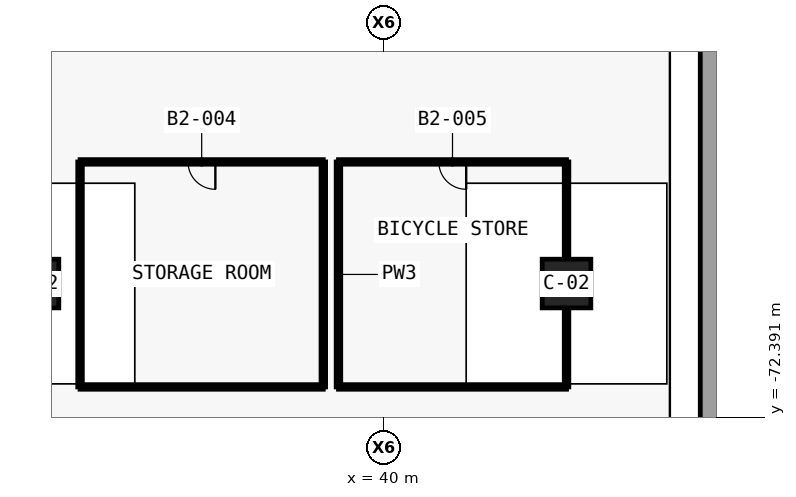
"""IFC4 building model, lengths in metres.
Left out: names, types, materials, properties, quantities, classifications, styles, units other than length and angle.
Written with IfcOpenShell. Run it as: python <this file> out.ifc"""

import sys

from ifc_helpers import new_model, si_unit, direction, frame, frame_2d, origin, origin_2d, place, context, subcontext, project, spatial, polyline, rectangle, outline, extrude, element, fill, save


model = new_model("IFC4")
c1 = context("Model", 3, precision=1e-05, world=origin(), true_north=direction((0.0, 1.0)))
c2 = subcontext(c1, "Body", "Model", "MODEL_VIEW")
j1 = project(units=[si_unit("LENGTHUNIT", "METRE"), si_unit("PLANEANGLEUNIT", "RADIAN")], contexts=[c1])
p1 = place(None, origin())
s1 = spatial("IfcSite", under=j1, at=p1, CompositionType="ELEMENT")
p2 = place(p1, origin())
s2 = spatial("IfcBuilding", under=s1, at=p2, CompositionType="ELEMENT")
p3 = place(p2, frame((0.0, 0.0, -9.0)))
s3 = spatial("IfcBuildingStorey", under=s2, at=p3, CompositionType="ELEMENT", Elevation=-9.0)
p4 = place(p3, frame((50.7, -83.0, 0.0), z_axis=(0.0, 0.0, 1.0), x_axis=(0.0, 1.0, 0.0)))
e1 = element("IfcWall", 1, at=p4, inside=s3, PredefinedType="SOLIDWALL", context=c2, shape_type="SweptSolid", body=[
    extrude(outline(polyline([(0.6, -0.3), (0.6, 0.3), (81.4, 0.3), (82.0, 0.3), (82.0, -0.3), (0.6, -0.3)])), origin(), (0.0, 0.0, 1.0), 4.5),
])
for number, where, z_axis, x_axis in (
    (2, (28.5, -68.0, 0.0), (0.0, 0.0, 1.0), (1.0, 0.0, 0.0)),
    (3, (46.0, -68.0, 0.0), (0.0, 0.0, 1.0), (1.0, 0.0, 0.0)),
):
    element("IfcColumn", number, at=place(p3, frame(where, z_axis=z_axis, x_axis=x_axis)), inside=s3, PredefinedType="COLUMN", context=c2, shape_type="SweptSolid", body=[
        extrude(rectangle(XDim=1.6, YDim=1.6, at=origin_2d()), origin(), (0.0, 0.0, 1.0), 4.5),
    ])
p5 = place(p3, frame((38.0, -63.999, 0.0), z_axis=(0.0, 0.0, 1.0), x_axis=(-1.0, 0.0, 0.0)))
e4 = element("IfcWall", 4, at=p5, inside=s3, PredefinedType="PARTITIONING", context=c2, shape_type="SweptSolid", body=[
    extrude(rectangle(XDim=8.0, YDim=0.15, at=frame_2d((4.0, 0.0))), origin(), (0.0, 0.0, 1.0), 3.47),
])
p6 = place(p5, frame((3.55, 0.0, 0.0)))
e5 = element("IfcOpeningElement", 5, at=p6, cuts=e4, PredefinedType="OPENING", context=c2, shape_type="SweptSolid", body=[
    extrude(rectangle(XDim=0.9, YDim=2.1, at=frame_2d((0.45, 1.05))), frame((0.0, 0.085, 0.0), z_axis=(0.0, -1.0, 0.0), x_axis=(1.0, 0.0, 0.0)), (0.0, 0.0, 1.0), 0.17),
])
p7 = place(p3, frame((29.999, -64.0, 0.0), z_axis=(0.0, 0.0, 1.0), x_axis=(0.0, -1.0, 0.0)))
e6 = element("IfcWall", 6, at=p7, inside=s3, PredefinedType="PARTITIONING", context=c2, shape_type="SweptSolid", body=[
    extrude(rectangle(XDim=7.4, YDim=0.15, at=frame_2d((3.7, 0.0))), origin(), (0.0, 0.0, 1.0), 3.07),
])
p8 = place(p3, frame((30.0, -71.401, 0.0), z_axis=(0.0, 0.0, 1.0), x_axis=(1.0, 0.0, 0.0)))
e7 = element("IfcWall", 7, at=p8, inside=s3, PredefinedType="PARTITIONING", context=c2, shape_type="SweptSolid", body=[
    extrude(rectangle(XDim=8.0, YDim=0.15, at=frame_2d((4.0, 0.0))), origin(), (0.0, 0.0, 1.0), 4.09),
])
p9 = place(p3, frame((38.001, -71.4, 0.0), z_axis=(0.0, 0.0, 1.0), x_axis=(0.0, 1.0, 0.0)))
e8 = element("IfcWall", 8, at=p9, inside=s3, PredefinedType="PARTITIONING", context=c2, shape_type="SweptSolid", body=[
    extrude(rectangle(XDim=7.4, YDim=0.15, at=frame_2d((3.7, 0.0))), origin(), (0.0, 0.0, 1.0), 3.07),
])
p10 = place(p3, frame((46.0, -63.999, 0.0), z_axis=(0.0, 0.0, 1.0), x_axis=(-1.0, 0.0, 0.0)))
e9 = element("IfcWall", 9, at=p10, inside=s3, PredefinedType="PARTITIONING", context=c2, shape_type="SweptSolid", body=[
    extrude(rectangle(XDim=7.5, YDim=0.15, at=frame_2d((3.75, 0.0))), origin(), (0.0, 0.0, 1.0), 3.07),
])
p11 = place(p10, frame((3.3, 0.0, 0.0)))
e10 = element("IfcOpeningElement", 10, at=p11, cuts=e9, PredefinedType="OPENING", context=c2, shape_type="SweptSolid", body=[
    extrude(rectangle(XDim=0.9, YDim=2.1, at=frame_2d((0.45, 1.05))), frame((0.0, 0.085, 0.0), z_axis=(0.0, -1.0, 0.0), x_axis=(1.0, 0.0, 0.0)), (0.0, 0.0, 1.0), 0.17),
])
p12 = place(p3, frame((38.499, -64.0, 0.0), z_axis=(0.0, 0.0, 1.0), x_axis=(0.0, -1.0, 0.0)))
e11 = element("IfcWall", 11, at=p12, inside=s3, PredefinedType="PARTITIONING", context=c2, shape_type="SweptSolid", body=[
    extrude(rectangle(XDim=7.4, YDim=0.15, at=frame_2d((3.7, 0.0))), origin(), (0.0, 0.0, 1.0), 3.07),
])
p13 = place(p3, frame((38.5, -71.401, 0.0), z_axis=(0.0, 0.0, 1.0), x_axis=(1.0, 0.0, 0.0)))
e12 = element("IfcWall", 12, at=p13, inside=s3, PredefinedType="PARTITIONING", context=c2, shape_type="SweptSolid", body=[
    extrude(rectangle(XDim=7.5, YDim=0.15, at=frame_2d((3.75, 0.0))), origin(), (0.0, 0.0, 1.0), 4.09),
])
p14 = place(p3, frame((46.001, -71.4, 0.0), z_axis=(0.0, 0.0, 1.0), x_axis=(0.0, 1.0, 0.0)))
e13 = element("IfcWall", 13, at=p14, inside=s3, PredefinedType="PARTITIONING", context=c2, shape_type="SweptSolid", body=[
    extrude(rectangle(XDim=2.58, YDim=0.15, at=frame_2d((1.29, 0.0))), origin(), (0.0, 0.0, 1.0), 4.09),
])
p15 = place(p3, frame((46.001, -67.18, 0.0), z_axis=(0.0, 0.0, 1.0), x_axis=(0.0, 1.0, 0.0)))
e14 = element("IfcWall", 14, at=p15, inside=s3, PredefinedType="PARTITIONING", context=c2, shape_type="SweptSolid", body=[
    extrude(rectangle(XDim=3.18, YDim=0.15, at=frame_2d((1.59, 0.0))), origin(), (0.0, 0.0, 1.0), 3.07),
])
p16 = place(p6, origin())
e15 = element("IfcDoor", 15, at=p16, inside=s3, OperationType="SINGLE_SWING_RIGHT", PredefinedType="DOOR", context=c2, shape_type="SweptSolid", body=[
    extrude(rectangle(XDim=0.9, YDim=2.1, at=frame_2d((0.45, 1.05))), frame((0.0, 0.025, 0.0), z_axis=(0.0, -1.0, 0.0), x_axis=(1.0, 0.0, 0.0)), (0.0, 0.0, 1.0), 0.05),
])
fill(e5, e15)
p17 = place(p11, origin())
e16 = element("IfcDoor", 16, at=p17, inside=s3, OperationType="SINGLE_SWING_LEFT", PredefinedType="DOOR", context=c2, shape_type="SweptSolid", body=[
    extrude(rectangle(XDim=0.9, YDim=2.1, at=frame_2d((0.45, 1.05))), frame((0.0, 0.025, 0.0), z_axis=(0.0, -1.0, 0.0), x_axis=(1.0, 0.0, 0.0)), (0.0, 0.0, 1.0), 0.05),
])
fill(e10, e16)
save(model, sys.argv[1])
